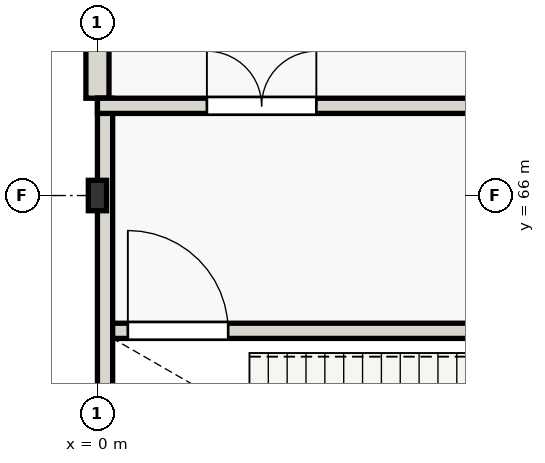
"""IFC4 building model, lengths in metres.
Left out: names, types, materials, properties, quantities, classifications, styles, units other than length and angle.
Written with IfcOpenShell. Run it as: python <this file> out.ifc"""

import sys

from ifc_helpers import new_model, si_unit, direction, frame, frame_2d, origin, origin_2d, place, context, subcontext, project, spatial, rectangle, i_section, extrude, element, fill, save


model = new_model("IFC4")
c1 = context("Model", 3, precision=1e-05, world=origin(), true_north=direction((0.0, 1.0)))
c2 = subcontext(c1, "Body", "Model", "MODEL_VIEW")
j1 = project(units=[si_unit("LENGTHUNIT", "METRE"), si_unit("PLANEANGLEUNIT", "RADIAN")], contexts=[c1])
p1 = place(None, origin())
s1 = spatial("IfcSite", under=j1, at=p1, CompositionType="ELEMENT")
p2 = place(p1, origin())
s2 = spatial("IfcBuilding", under=s1, at=p2, CompositionType="ELEMENT")
p3 = place(p2, frame((0.0, 0.0, 4.2)))
s3 = spatial("IfcBuildingStorey", under=s2, at=p3, CompositionType="ELEMENT", Elevation=4.2)
p4 = place(p3, frame((0.0, 66.0, 0.0), z_axis=(0.0, 0.0, 1.0), x_axis=(1.0, 0.0, 0.0)))
e1 = element("IfcColumn", 1, at=p4, inside=s3, PredefinedType="COLUMN", context=c2, shape_type="SweptSolid", body=[
    extrude(i_section(OverallWidth=0.3, OverallDepth=0.5, WebThickness=0.014, FlangeThickness=0.028, at=origin_2d()), origin(), (0.0, 0.0, 1.0), 4.2),
])
p5 = place(p3, frame((0.0, 67.6, 0.0), z_axis=(0.0, 0.0, 1.0), x_axis=(0.0, 1.0, 0.0)))
e2 = element("IfcWall", 2, at=p5, inside=s3, PredefinedType="SOLIDWALL", context=c2, shape_type="SweptSolid", body=[
    extrude(rectangle(XDim=4.4, YDim=0.38, at=frame_2d((2.2, 0.0))), origin(), (0.0, 0.0, 1.0), 3.56),
])
p6 = place(p5, frame((1.4, 0.0, 0.9)))
e3 = element("IfcOpeningElement", 3, at=p6, cuts=e2, PredefinedType="OPENING", context=c2, shape_type="SweptSolid", body=[
    extrude(rectangle(XDim=1.6, YDim=2.0, at=frame_2d((0.8, 1.0))), frame((0.0, 0.2, 0.0), z_axis=(0.0, -1.0, 0.0), x_axis=(1.0, 0.0, 0.0)), (0.0, 0.0, 1.0), 0.4),
])
p7 = place(p3, frame((0.125, 58.4, 0.0), z_axis=(0.0, 0.0, 1.0), x_axis=(0.0, 1.0, 0.0)))
e4 = element("IfcWall", 4, at=p7, inside=s3, PredefinedType="SHEAR", context=c2, shape_type="SweptSolid", body=[
    extrude(rectangle(XDim=9.2, YDim=0.25, at=frame_2d((4.6, 0.0))), origin(), (0.0, 0.0, 1.0), 4.2),
])
p8 = place(p3, frame((0.0, 67.475, 0.0), z_axis=(0.0, 0.0, 1.0), x_axis=(1.0, 0.0, 0.0)))
e5 = element("IfcWall", 5, at=p8, inside=s3, PredefinedType="SHEAR", context=c2, shape_type="SweptSolid", body=[
    extrude(rectangle(XDim=9.2, YDim=0.25, at=frame_2d((4.6, 0.0))), origin(), (0.0, 0.0, 1.0), 4.2),
])
p9 = place(p8, frame((1.8, 0.0, 0.0)))
e6 = element("IfcOpeningElement", 6, at=p9, cuts=e5, PredefinedType="OPENING", context=c2, shape_type="SweptSolid", body=[
    extrude(rectangle(XDim=1.8, YDim=2.15, at=frame_2d((0.9, 1.075))), frame((0.0, 0.135, 0.0), z_axis=(0.0, -1.0, 0.0), x_axis=(1.0, 0.0, 0.0)), (0.0, 0.0, 1.0), 0.27),
])
p10 = place(p3, frame((0.25, 63.775, 0.0), z_axis=(0.0, 0.0, 1.0), x_axis=(1.0, 0.0, 0.0)))
e7 = element("IfcWall", 7, at=p10, inside=s3, PredefinedType="SHEAR", context=c2, shape_type="SweptSolid", body=[
    extrude(rectangle(XDim=8.7, YDim=0.25, at=frame_2d((4.35, 0.0))), origin(), (0.0, 0.0, 1.0), 4.2),
])
p11 = place(p10, frame((0.25, 0.0, 0.0)))
e8 = element("IfcOpeningElement", 8, at=p11, cuts=e7, PredefinedType="OPENING", context=c2, shape_type="SweptSolid", body=[
    extrude(rectangle(XDim=1.65, YDim=2.1, at=frame_2d((0.825, 1.05))), frame((0.0, 0.135, 0.0), z_axis=(0.0, -1.0, 0.0), x_axis=(1.0, 0.0, 0.0)), (0.0, 0.0, 1.0), 0.27),
])
p12 = place(p9, origin())
e9 = element("IfcDoor", 9, at=p12, inside=s3, OperationType="DOUBLE_DOOR_SINGLE_SWING", PredefinedType="DOOR", context=c2, shape_type="SweptSolid", body=[
    extrude(rectangle(XDim=1.8, YDim=2.15, at=frame_2d((0.9, 1.075))), frame((0.0, 0.025, 0.0), z_axis=(0.0, -1.0, 0.0), x_axis=(1.0, 0.0, 0.0)), (0.0, 0.0, 1.0), 0.05),
])
fill(e6, e9)
p13 = place(p11, origin())
e10 = element("IfcDoor", 10, at=p13, inside=s3, OperationType="SINGLE_SWING_LEFT", PredefinedType="DOOR", context=c2, shape_type="SweptSolid", body=[
    extrude(rectangle(XDim=1.65, YDim=2.1, at=frame_2d((0.825, 1.05))), frame((0.0, 0.025, 0.0), z_axis=(0.0, -1.0, 0.0), x_axis=(1.0, 0.0, 0.0)), (0.0, 0.0, 1.0), 0.05),
])
fill(e8, e10)
save(model, sys.argv[1])
